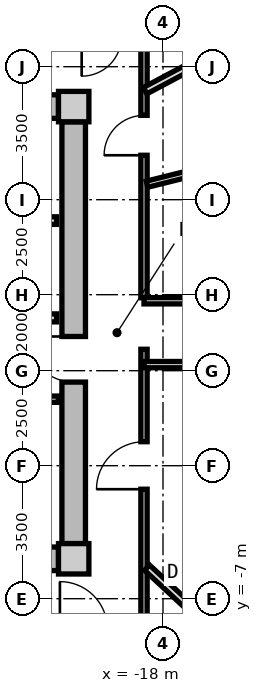
"""IFC4 building model, lengths in metres.
Left out: names, types, materials, properties, quantities, classifications, styles, units other than length and angle.
Written with IfcOpenShell. Run it as: python <this file> out.ifc"""

import sys

from ifc_helpers import new_model, si_unit, direction, frame, frame_2d, origin, origin_2d, place, context, subcontext, project, spatial, rectangle, extrude, source, transform, mapped, element, fill, save


model = new_model("IFC4")
c1 = context("Model", 3, precision=1e-05, world=origin(), true_north=direction((0.0, 1.0)))
c2 = subcontext(c1, "Body", "Model", "MODEL_VIEW")
j1 = project(units=[si_unit("LENGTHUNIT", "METRE"), si_unit("PLANEANGLEUNIT", "RADIAN")], contexts=[c1])
p1 = place(None, origin())
s1 = spatial("IfcSite", under=j1, at=p1, CompositionType="ELEMENT")
p2 = place(p1, origin())
s2 = spatial("IfcBuilding", under=s1, at=p2, CompositionType="ELEMENT")
p3 = place(p2, frame((0.0, 0.0, 180.05)))
s3 = spatial("IfcBuildingStorey", under=s2, at=p3, CompositionType="ELEMENT", Elevation=180.05)
m1 = source(origin(), c2, "Body", "SweptSolid", [
    extrude(rectangle(XDim=0.8, YDim=0.8, at=origin_2d()), origin(), (0.0, 0.0, 1.0), 3.05),
])
for number, where, z_axis, x_axis in (
    (1, (-20.35, -5.95, 0.0), (0.0, 0.0, 1.0), (1.0, 0.0, 0.0)),
    (2, (-20.35, 5.95, 0.0), (0.0, 0.0, 1.0), (1.0, 0.0, 0.0)),
):
    element("IfcColumn", number, at=place(p3, frame(where, z_axis=z_axis, x_axis=x_axis)), inside=s3, PredefinedType="COLUMN", context=c2, shape_type="MappedRepresentation", body=[
        mapped(m1, transform((0.0, 0.0, 0.0), x_axis=(1.0, 0.0, 0.0), y_axis=(0.0, 1.0, 0.0), z_axis=(0.0, 0.0, 1.0), scale=1.0)),
    ])
m2 = source(origin(), c2, "Body", "SweptSolid", [
    extrude(rectangle(XDim=14.5, YDim=0.62, at=frame_2d((7.25, 0.0))), origin(), (0.0, 0.0, 1.0), 2.81),
])
for number, where, z_axis, x_axis in (
    (3, (-35.25, 5.95, 0.0), (0.0, 0.0, 1.0), (1.0, 0.0, 0.0)),
    (4, (-20.75, -5.95, 0.0), (0.0, 0.0, 1.0), (-1.0, 0.0, 0.0)),
):
    element("IfcWall", number, at=place(p3, frame(where, z_axis=z_axis, x_axis=x_axis)), inside=s3, PredefinedType="SHEAR", context=c2, shape_type="MappedRepresentation", body=[
        mapped(m2, transform((0.0, 0.0, 0.0), x_axis=(1.0, 0.0, 0.0), y_axis=(0.0, 1.0, 0.0), z_axis=(0.0, 0.0, 1.0), scale=1.0)),
    ])
m3 = source(origin(), c2, "Body", "SweptSolid", [
    extrude(rectangle(XDim=11.1, YDim=0.62, at=frame_2d((5.55, 0.0))), origin(), (0.0, 0.0, 1.0), 2.81),
])
p4 = place(p3, frame((-20.35, 5.55, 0.0), z_axis=(0.0, 0.0, 1.0), x_axis=(0.0, -1.0, 0.0)))
e5 = element("IfcWall", 5, at=p4, inside=s3, PredefinedType="SHEAR", context=c2, shape_type="MappedRepresentation", body=[
    mapped(m3, transform((0.0, 0.0, 0.0), x_axis=(1.0, 0.0, 0.0), y_axis=(0.0, 1.0, 0.0), z_axis=(0.0, 0.0, 1.0), scale=1.0)),
])
p5 = place(p4, frame((5.65, 0.0, 0.0)))
e6 = element("IfcOpeningElement", 6, at=p5, cuts=e5, PredefinedType="OPENING", context=c2, shape_type="SweptSolid", body=[
    extrude(rectangle(XDim=1.2, YDim=2.15, at=frame_2d((0.6, 1.075))), frame((0.0, 0.32, 0.0), z_axis=(0.0, -1.0, 0.0), x_axis=(1.0, 0.0, 0.0)), (0.0, 0.0, 1.0), 0.64),
])
m4 = source(origin(), c2, "Body", "SweptSolid", [
    extrude(rectangle(XDim=3.2, YDim=0.2, at=frame_2d((1.6, 0.0))), origin(), (0.0, 0.0, 1.0), 2.795),
])
p6 = place(p3, frame((-24.0, 2.95, 0.0), z_axis=(0.0, 0.0, 1.0), x_axis=(1.0, 0.0, 0.0)))
e7 = element("IfcWall", 7, at=p6, inside=s3, PredefinedType="PARTITIONING", context=c2, shape_type="MappedRepresentation", body=[
    mapped(m4, transform((0.0, 0.0, 0.0), x_axis=(1.0, 0.0, 0.0), y_axis=(0.0, 1.0, 0.0), z_axis=(0.0, 0.0, 1.0), scale=1.0)),
])
m5 = source(origin(), c2, "Body", "SweptSolid", [
    extrude(rectangle(XDim=6.66, YDim=0.21, at=frame_2d((3.33, 0.0))), origin(), (0.0, 0.0, 1.0), 2.795),
])
p7 = place(p3, frame((-27.46, 0.39, 0.0), z_axis=(0.0, 0.0, 1.0), x_axis=(1.0, 0.0, 0.0)))
e8 = element("IfcWall", 8, at=p7, inside=s3, PredefinedType="PARTITIONING", context=c2, shape_type="MappedRepresentation", body=[
    mapped(m5, transform((0.0, 0.0, 0.0), x_axis=(1.0, 0.0, 0.0), y_axis=(0.0, 1.0, 0.0), z_axis=(0.0, 0.0, 1.0), scale=1.0)),
])
p8 = place(p7, frame((1.0, 0.0, 0.0)))
e9 = element("IfcOpeningElement", 9, at=p8, cuts=e8, PredefinedType="OPENING", context=c2, shape_type="SweptSolid", body=[
    extrude(rectangle(XDim=1.2, YDim=2.15, at=frame_2d((0.6, 1.075))), frame((0.0, 0.115, 0.0), z_axis=(0.0, -1.0, 0.0), x_axis=(1.0, 0.0, 0.0)), (0.0, 0.0, 1.0), 0.23),
])
m6 = source(origin(), c2, "Body", "SweptSolid", [
    extrude(rectangle(XDim=2.7, YDim=0.165, at=frame_2d((1.35, 0.0))), origin(), (0.0, 0.0, 1.0), 2.795),
])
p9 = place(p3, frame((-23.45, -1.75, 0.0), z_axis=(0.0, 0.0, 1.0), x_axis=(1.0, 0.0, 0.0)))
e10 = element("IfcWall", 10, at=p9, inside=s3, PredefinedType="PARTITIONING", context=c2, shape_type="MappedRepresentation", body=[
    mapped(m6, transform((0.0, 0.0, 0.0), x_axis=(1.0, 0.0, 0.0), y_axis=(0.0, 1.0, 0.0), z_axis=(0.0, 0.0, 1.0), scale=1.0)),
])
p10 = place(p9, frame((0.222, 0.0, 0.0)))
e11 = element("IfcOpeningElement", 11, at=p10, cuts=e10, PredefinedType="OPENING", context=c2, shape_type="SweptSolid", body=[
    extrude(rectangle(XDim=0.925, YDim=2.1, at=frame_2d((0.462, 1.05))), frame((0.0, 0.093, 0.0), z_axis=(0.0, -1.0, 0.0), x_axis=(1.0, 0.0, 0.0)), (0.0, 0.0, 1.0), 0.185),
])
p11 = place(p9, frame((1.522, 0.0, 0.0)))
e12 = element("IfcOpeningElement", 12, at=p11, cuts=e10, PredefinedType="OPENING", context=c2, shape_type="SweptSolid", body=[
    extrude(rectangle(XDim=0.925, YDim=2.1, at=frame_2d((0.462, 1.05))), frame((0.0, 0.093, 0.0), z_axis=(0.0, -1.0, 0.0), x_axis=(1.0, 0.0, 0.0)), (0.0, 0.0, 1.0), 0.185),
])
m7 = source(origin(), c2, "Body", "SweptSolid", [
    extrude(rectangle(XDim=6.88, YDim=0.165, at=frame_2d((3.44, 0.0))), origin(), (0.0, 0.0, 1.0), 2.795),
])
p12 = place(p3, frame((-18.5, 7.8, 0.0), z_axis=(0.0, 0.0, 1.0), x_axis=(0.0, -1.0, 0.0)))
e13 = element("IfcWall", 13, at=p12, inside=s3, PredefinedType="PARTITIONING", context=c2, shape_type="MappedRepresentation", body=[
    mapped(m7, transform((0.0, 0.0, 0.0), x_axis=(1.0, 0.0, 0.0), y_axis=(0.0, 1.0, 0.0), z_axis=(0.0, 0.0, 1.0), scale=1.0)),
])
p13 = place(p12, frame((2.081, 0.0, 0.0)))
e14 = element("IfcOpeningElement", 14, at=p13, cuts=e13, PredefinedType="OPENING", context=c2, shape_type="SweptSolid", body=[
    extrude(rectangle(XDim=1.05, YDim=2.15, at=frame_2d((0.525, 1.075))), frame((0.0, 0.093, 0.0), z_axis=(0.0, -1.0, 0.0), x_axis=(1.0, 0.0, 0.0)), (0.0, 0.0, 1.0), 0.185),
])
m8 = source(origin(), c2, "Body", "SweptSolid", [
    extrude(rectangle(XDim=7.365, YDim=0.165, at=frame_2d((3.682, 0.0))), origin(), (0.0, 0.0, 1.0), 2.795),
])
p14 = place(p3, frame((-18.5, -0.436, 0.0), z_axis=(0.0, 0.0, 1.0), x_axis=(0.0, -1.0, 0.0)))
e15 = element("IfcWall", 15, at=p14, inside=s3, PredefinedType="PARTITIONING", context=c2, shape_type="MappedRepresentation", body=[
    mapped(m8, transform((0.0, 0.0, 0.0), x_axis=(1.0, 0.0, 0.0), y_axis=(0.0, 1.0, 0.0), z_axis=(0.0, 0.0, 1.0), scale=1.0)),
])
p15 = place(p14, frame((2.433, 0.0, 0.0)))
e16 = element("IfcOpeningElement", 16, at=p15, cuts=e15, PredefinedType="OPENING", context=c2, shape_type="SweptSolid", body=[
    extrude(rectangle(XDim=1.25, YDim=2.2, at=frame_2d((0.625, 1.1))), frame((0.0, 0.093, 0.0), z_axis=(0.0, -1.0, 0.0), x_axis=(1.0, 0.0, 0.0)), (0.0, 0.0, 1.0), 0.185),
])
m9 = source(origin(), c2, "Body", "SweptSolid", [
    extrude(rectangle(XDim=8.305, YDim=0.165, at=frame_2d((4.153, 0.0))), origin(), (0.0, 0.0, 1.0), 2.345),
])
p16 = place(p3, frame((-18.42, 3.908, 0.0), z_axis=(0.0, 0.0, 1.0), x_axis=(0.970309994378, 0.241864662175, 0.0)))
e17 = element("IfcWall", 17, at=p16, inside=s3, PredefinedType="PARTITIONING", context=c2, shape_type="MappedRepresentation", body=[
    mapped(m9, transform((0.0, 0.0, 0.0), x_axis=(1.0, 0.0, 0.0), y_axis=(0.0, 1.0, 0.0), z_axis=(0.0, 0.0, 1.0), scale=1.0)),
])
m10 = source(origin(), c2, "Body", "SweptSolid", [
    extrude(rectangle(XDim=8.189, YDim=0.165, at=frame_2d((4.094, 0.0))), origin(), (0.0, 0.0, 1.0), 2.795),
])
p17 = place(p3, frame((-18.5, 0.84, 0.0), z_axis=(0.0, 0.0, 1.0), x_axis=(1.0, 0.0, 0.0)))
e18 = element("IfcWall", 18, at=p17, inside=s3, PredefinedType="PARTITIONING", context=c2, shape_type="MappedRepresentation", body=[
    mapped(m10, transform((0.0, 0.0, 0.0), x_axis=(1.0, 0.0, 0.0), y_axis=(0.0, 1.0, 0.0), z_axis=(0.0, 0.0, 1.0), scale=1.0)),
])
p18 = place(p17, frame((3.619, 0.0, 0.0)))
e19 = element("IfcOpeningElement", 19, at=p18, cuts=e18, PredefinedType="OPENING", context=c2, shape_type="SweptSolid", body=[
    extrude(rectangle(XDim=0.95, YDim=2.1, at=frame_2d((0.475, 1.05))), frame((0.0, 0.093, 0.0), z_axis=(0.0, -1.0, 0.0), x_axis=(1.0, 0.0, 0.0)), (0.0, 0.0, 1.0), 0.185),
])
p19 = place(p3, frame((-10.311, -0.84, 0.0), z_axis=(0.0, 0.0, 1.0), x_axis=(-1.0, 0.0, 0.0)))
e20 = element("IfcWall", 20, at=p19, inside=s3, PredefinedType="PARTITIONING", context=c2, shape_type="MappedRepresentation", body=[
    mapped(m10, transform((0.0, 0.0, 0.0), x_axis=(1.0, 0.0, 0.0), y_axis=(0.0, 1.0, 0.0), z_axis=(0.0, 0.0, 1.0), scale=1.0)),
])
m11 = source(origin(), c2, "Body", "SweptSolid", [
    extrude(rectangle(XDim=6.665, YDim=0.19, at=frame_2d((3.333, 0.0))), origin(), (0.0, 0.0, 1.0), 2.795),
])
p20 = place(p3, frame((-18.47, 6.37, 0.0), z_axis=(0.0, 0.0, 1.0), x_axis=(0.88263769619, 0.470053930166, 0.0)))
e21 = element("IfcWall", 21, at=p20, inside=s3, PredefinedType="PARTITIONING", context=c2, shape_type="MappedRepresentation", body=[
    mapped(m11, transform((0.0, 0.0, 0.0), x_axis=(1.0, 0.0, 0.0), y_axis=(0.0, 1.0, 0.0), z_axis=(0.0, 0.0, 1.0), scale=1.0)),
])
m12 = source(origin(), c2, "Body", "SweptSolid", [
    extrude(rectangle(XDim=4.927, YDim=0.19, at=frame_2d((2.463, 0.0))), origin(), (0.0, 0.0, 1.0), 2.435),
])
p21 = place(p3, frame((-18.42, -6.183, 0.0), z_axis=(0.0, 0.0, 1.0), x_axis=(0.732191335987, -0.681098999783, 0.0)))
e22 = element("IfcWall", 22, at=p21, inside=s3, PredefinedType="PARTITIONING", context=c2, shape_type="MappedRepresentation", body=[
    mapped(m12, transform((0.0, 0.0, 0.0), x_axis=(1.0, 0.0, 0.0), y_axis=(0.0, 1.0, 0.0), z_axis=(0.0, 0.0, 1.0), scale=1.0)),
])
m13 = source(origin(), c2, "Body", "SweptSolid", [
    extrude(rectangle(XDim=1.2, YDim=2.15, at=frame_2d((0.6, 1.075))), frame((0.0, 0.025, 0.0), z_axis=(0.0, -1.0, 0.0), x_axis=(1.0, 0.0, 0.0)), (0.0, 0.0, 1.0), 0.05),
])
p22 = place(p5, frame((1.2, 0.0, 0.0), z_axis=(0.0, 0.0, 1.0), x_axis=(-1.0, 0.0, 0.0)))
e23 = element("IfcDoor", 23, at=p22, inside=s3, OperationType="SINGLE_SWING_RIGHT", PredefinedType="DOOR", context=c2, shape_type="MappedRepresentation", body=[
    mapped(m13, transform((0.0, 0.0, 0.0), x_axis=(1.0, 0.0, 0.0), y_axis=(0.0, 1.0, 0.0), z_axis=(0.0, 0.0, 1.0), scale=1.0)),
])
fill(e6, e23)
m14 = source(origin(), c2, "Body", "SweptSolid", [
    extrude(rectangle(XDim=1.05, YDim=2.15, at=frame_2d((0.525, 1.075))), frame((0.0, 0.025, 0.0), z_axis=(0.0, -1.0, 0.0), x_axis=(1.0, 0.0, 0.0)), (0.0, 0.0, 1.0), 0.05),
])
p23 = place(p13, frame((1.05, 0.0, 0.0), z_axis=(0.0, 0.0, 1.0), x_axis=(-1.0, 0.0, 0.0)))
e24 = element("IfcDoor", 24, at=p23, inside=s3, OperationType="SINGLE_SWING_LEFT", PredefinedType="DOOR", context=c2, shape_type="MappedRepresentation", body=[
    mapped(m14, transform((0.0, 0.0, 0.0), x_axis=(1.0, 0.0, 0.0), y_axis=(0.0, 1.0, 0.0), z_axis=(0.0, 0.0, 1.0), scale=1.0)),
])
fill(e14, e24)
m15 = source(origin(), c2, "Body", "SweptSolid", [
    extrude(rectangle(XDim=1.25, YDim=2.2, at=frame_2d((0.625, 1.1))), frame((0.0, 0.025, 0.0), z_axis=(0.0, -1.0, 0.0), x_axis=(1.0, 0.0, 0.0)), (0.0, 0.0, 1.0), 0.05),
])
p24 = place(p15, frame((1.25, 0.0, 0.0), z_axis=(0.0, 0.0, 1.0), x_axis=(-1.0, 0.0, 0.0)))
e25 = element("IfcDoor", 25, at=p24, inside=s3, OperationType="SINGLE_SWING_LEFT", PredefinedType="DOOR", context=c2, shape_type="MappedRepresentation", body=[
    mapped(m15, transform((0.0, 0.0, 0.0), x_axis=(1.0, 0.0, 0.0), y_axis=(0.0, 1.0, 0.0), z_axis=(0.0, 0.0, 1.0), scale=1.0)),
])
fill(e16, e25)
save(model, sys.argv[1])
